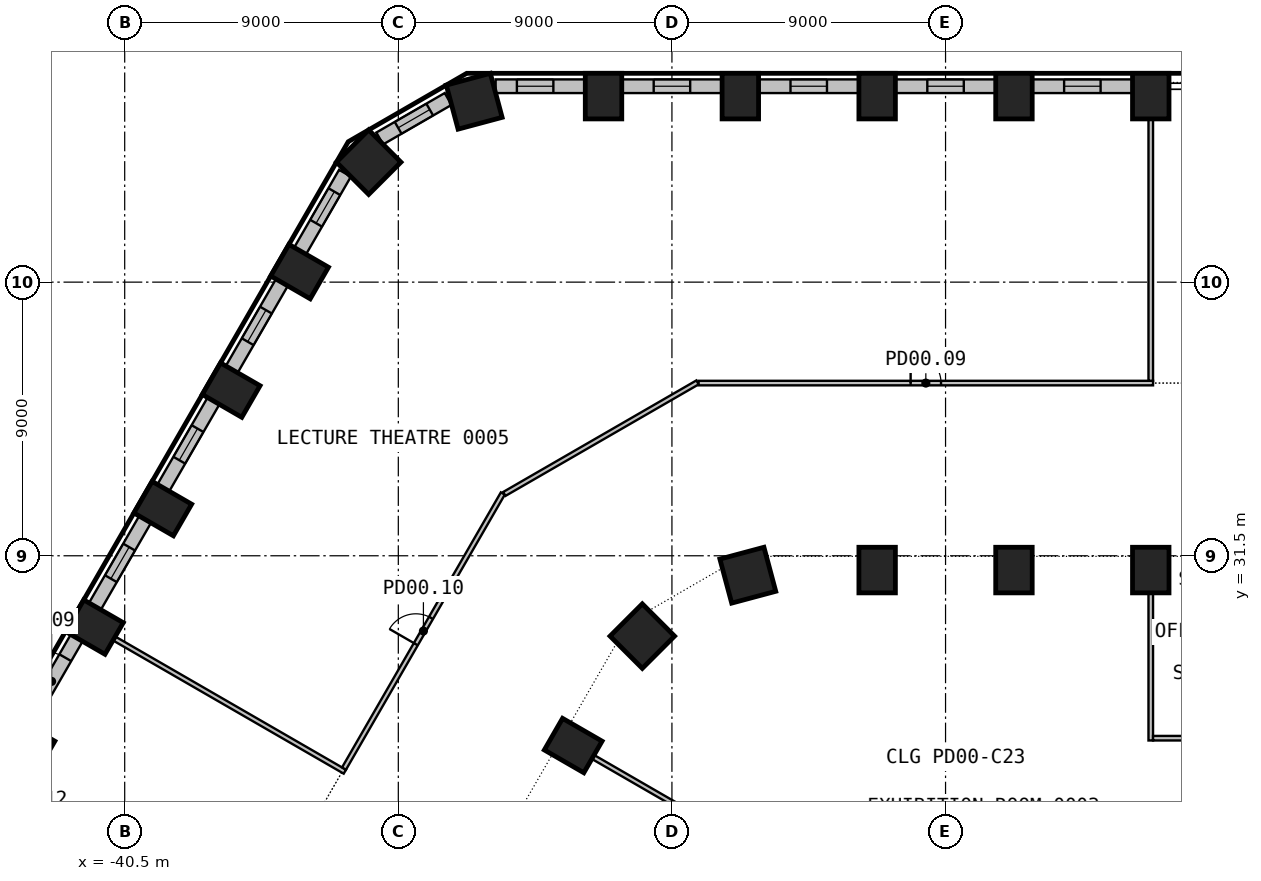
"""IFC4 building model, lengths in metres.
Left out: names, types, materials, properties, quantities, classifications, styles, units other than length and angle.
Written with IfcOpenShell. Run it as: python <this file> out.ifc"""

import sys

from ifc_helpers import new_model, si_unit, direction, frame, frame_2d, origin, origin_2d, place, context, subcontext, project, spatial, rectangle, extrude, element, fill, save


model = new_model("IFC4")
c1 = context("Model", 3, precision=1e-05, world=origin(), true_north=direction((0.0, 1.0)))
c2 = subcontext(c1, "Body", "Model", "MODEL_VIEW")
j1 = project(units=[si_unit("LENGTHUNIT", "METRE"), si_unit("PLANEANGLEUNIT", "RADIAN")], contexts=[c1])
p1 = place(None, origin())
s1 = spatial("IfcSite", under=j1, at=p1, CompositionType="ELEMENT")
p2 = place(p1, origin())
s2 = spatial("IfcBuilding", under=s1, at=p2, CompositionType="ELEMENT")
p3 = place(p2, origin())
s3 = spatial("IfcBuildingStorey", under=s2, at=p3, CompositionType="ELEMENT", Elevation=0.0)
for number, where, z_axis, x_axis in (
    (1, (-6.75, 46.618, 0.0), (0.0, 0.0, 1.0), (-1.0, 0.0, 0.0)),
    (2, (-11.25, 46.618, 0.0), (0.0, 0.0, 1.0), (-1.0, 0.0, 0.0)),
    (3, (-15.75, 46.618, 0.0), (0.0, 0.0, 1.0), (-1.0, 0.0, 0.0)),
    (4, (-20.25, 46.618, 0.0), (0.0, 0.0, 1.0), (-1.0, 0.0, 0.0)),
    (5, (-24.75, 46.618, 0.0), (0.0, 0.0, 1.0), (-1.0, 0.0, 0.0)),
):
    element("IfcColumn", number, at=place(p3, frame(where, z_axis=z_axis, x_axis=x_axis)), inside=s3, PredefinedType="COLUMN", context=c2, shape_type="SweptSolid", body=[
        extrude(rectangle(XDim=1.2, YDim=1.5, at=origin_2d()), origin(), (0.0, 0.0, 1.0), 6.0),
    ])
for number, where, z_axis, x_axis in (
    (6, (-29.004, 46.45, 0.0), (0.0, 0.0, 1.0), (-0.966, -0.259, 0.0)),
    (7, (-32.475, 44.446, 0.0), (0.0, 0.0, 1.0), (-0.707, -0.707, 0.0)),
):
    element("IfcColumn", number, at=place(p3, frame(where, z_axis=z_axis, x_axis=x_axis)), inside=s3, PredefinedType="COLUMN", context=c2, shape_type="SweptSolid", body=[
        extrude(rectangle(XDim=1.5, YDim=1.5, at=origin_2d()), origin(), (0.0, 0.0, 1.0), 6.0),
    ])
for number, where, z_axis, x_axis in (
    (8, (-34.748, 40.846, 0.0), (0.0, 0.0, 1.0), (-0.5, -0.866, 0.0)),
    (9, (-36.998, 36.949, 0.0), (0.0, 0.0, 1.0), (-0.5, -0.866, 0.0)),
    (10, (-39.248, 33.052, 0.0), (0.0, 0.0, 1.0), (-0.5, -0.866, 0.0)),
    (11, (-41.498, 29.155, 0.0), (0.0, 0.0, 1.0), (-0.5, -0.866, 0.0)),
    (12, (-43.748, 25.258, 0.0), (0.0, 0.0, 1.0), (-0.5, -0.866, 0.0)),
):
    element("IfcColumn", number, at=place(p3, frame(where, z_axis=z_axis, x_axis=x_axis)), inside=s3, PredefinedType="COLUMN", context=c2, shape_type="SweptSolid", body=[
        extrude(rectangle(XDim=1.2, YDim=1.5, at=origin_2d()), origin(), (0.0, 0.0, 1.0), 6.0),
    ])
for number, where, z_axis, x_axis in (
    (13, (-6.75, 31.03, 0.0), (0.0, 0.0, 1.0), (-1.0, 0.0, 0.0)),
    (14, (-11.25, 31.03, 0.0), (0.0, 0.0, 1.0), (-1.0, 0.0, 0.0)),
    (15, (-15.75, 31.03, 0.0), (0.0, 0.0, 1.0), (-1.0, 0.0, 0.0)),
):
    element("IfcColumn", number, at=place(p3, frame(where, z_axis=z_axis, x_axis=x_axis)), inside=s3, PredefinedType="COLUMN", context=c2, shape_type="SweptSolid", body=[
        extrude(rectangle(XDim=1.2, YDim=1.5, at=origin_2d()), origin(), (0.0, 0.0, 1.0), 5.6),
    ])
for number, where, z_axis, x_axis in (
    (16, (-20.004, 30.861, 0.0), (0.0, 0.0, 1.0), (-0.966, -0.259, 0.0)),
    (17, (-23.475, 28.857, 0.0), (0.0, 0.0, 1.0), (-0.707, -0.707, 0.0)),
):
    element("IfcColumn", number, at=place(p3, frame(where, z_axis=z_axis, x_axis=x_axis)), inside=s3, PredefinedType="COLUMN", context=c2, shape_type="SweptSolid", body=[
        extrude(rectangle(XDim=1.5, YDim=1.5, at=origin_2d()), origin(), (0.0, 0.0, 1.0), 5.6),
    ])
p4 = place(p3, frame((-25.748, 25.258, 0.0), z_axis=(0.0, 0.0, 1.0), x_axis=(-0.5, -0.866025403784, 0.0)))
e18 = element("IfcColumn", 18, at=p4, inside=s3, PredefinedType="COLUMN", context=c2, shape_type="SweptSolid", body=[
    extrude(rectangle(XDim=1.2, YDim=1.5, at=origin_2d()), origin(), (0.0, 0.0, 1.0), 5.6),
])
p5 = place(p3, frame((-7.351, 46.943, 0.0), z_axis=(0.0, 0.0, 1.0), x_axis=(-1.0, 0.0, 0.0)))
e19 = element("IfcWall", 19, at=p5, inside=s3, PredefinedType="SOLIDWALL", context=c2, shape_type="SweptSolid", body=[
    extrude(rectangle(XDim=3.299, YDim=0.45, at=frame_2d((1.649, 0.0))), origin(), (0.0, 0.0, 1.0), 6.0),
])
p6 = place(p5, frame((1.05, 0.0, 0.9)))
e20 = element("IfcOpeningElement", 20, at=p6, cuts=e19, PredefinedType="OPENING", context=c2, shape_type="SweptSolid", body=[
    extrude(rectangle(XDim=1.2, YDim=4.2, at=frame_2d((0.6, 2.1))), frame((0.0, 0.235, 0.0), z_axis=(0.0, -1.0, 0.0), x_axis=(1.0, 0.0, 0.0)), (0.0, 0.0, 1.0), 0.47),
])
p7 = place(p3, frame((-11.851, 46.943, 0.0), z_axis=(0.0, 0.0, 1.0), x_axis=(-1.0, 0.0, 0.0)))
e21 = element("IfcWall", 21, at=p7, inside=s3, PredefinedType="SOLIDWALL", context=c2, shape_type="SweptSolid", body=[
    extrude(rectangle(XDim=3.299, YDim=0.45, at=frame_2d((1.649, 0.0))), origin(), (0.0, 0.0, 1.0), 6.0),
])
p8 = place(p7, frame((1.05, 0.0, 0.9)))
e22 = element("IfcOpeningElement", 22, at=p8, cuts=e21, PredefinedType="OPENING", context=c2, shape_type="SweptSolid", body=[
    extrude(rectangle(XDim=1.2, YDim=4.2, at=frame_2d((0.6, 2.1))), frame((0.0, 0.235, 0.0), z_axis=(0.0, -1.0, 0.0), x_axis=(1.0, 0.0, 0.0)), (0.0, 0.0, 1.0), 0.47),
])
p9 = place(p3, frame((-16.351, 46.943, 0.0), z_axis=(0.0, 0.0, 1.0), x_axis=(-1.0, 0.0, 0.0)))
e23 = element("IfcWall", 23, at=p9, inside=s3, PredefinedType="SOLIDWALL", context=c2, shape_type="SweptSolid", body=[
    extrude(rectangle(XDim=3.299, YDim=0.45, at=frame_2d((1.649, 0.0))), origin(), (0.0, 0.0, 1.0), 6.0),
])
p10 = place(p9, frame((1.05, 0.0, 0.9)))
e24 = element("IfcOpeningElement", 24, at=p10, cuts=e23, PredefinedType="OPENING", context=c2, shape_type="SweptSolid", body=[
    extrude(rectangle(XDim=1.2, YDim=4.2, at=frame_2d((0.6, 2.1))), frame((0.0, 0.235, 0.0), z_axis=(0.0, -1.0, 0.0), x_axis=(1.0, 0.0, 0.0)), (0.0, 0.0, 1.0), 0.47),
])
p11 = place(p3, frame((-20.851, 46.943, 0.0), z_axis=(0.0, 0.0, 1.0), x_axis=(-1.0, 0.0, 0.0)))
e25 = element("IfcWall", 25, at=p11, inside=s3, PredefinedType="SOLIDWALL", context=c2, shape_type="SweptSolid", body=[
    extrude(rectangle(XDim=3.299, YDim=0.45, at=frame_2d((1.649, 0.0))), origin(), (0.0, 0.0, 1.0), 6.0),
])
p12 = place(p11, frame((1.05, 0.0, 0.9)))
e26 = element("IfcOpeningElement", 26, at=p12, cuts=e25, PredefinedType="OPENING", context=c2, shape_type="SweptSolid", body=[
    extrude(rectangle(XDim=1.2, YDim=4.2, at=frame_2d((0.6, 2.1))), frame((0.0, 0.235, 0.0), z_axis=(0.0, -1.0, 0.0), x_axis=(1.0, 0.0, 0.0)), (0.0, 0.0, 1.0), 0.47),
])
p13 = place(p3, frame((-25.351, 46.943, 0.0), z_axis=(0.0, 0.0, 1.0), x_axis=(-1.0, 0.0, 0.0)))
e27 = element("IfcWall", 27, at=p13, inside=s3, PredefinedType="SOLIDWALL", context=c2, shape_type="SweptSolid", body=[
    extrude(rectangle(XDim=2.948, YDim=0.45, at=frame_2d((1.474, 0.0))), origin(), (0.0, 0.0, 1.0), 6.0),
])
p14 = place(p13, frame((1.05, 0.0, 0.9)))
e28 = element("IfcOpeningElement", 28, at=p14, cuts=e27, PredefinedType="OPENING", context=c2, shape_type="SweptSolid", body=[
    extrude(rectangle(XDim=1.2, YDim=4.2, at=frame_2d((0.6, 2.1))), frame((0.0, 0.235, 0.0), z_axis=(0.0, -1.0, 0.0), x_axis=(1.0, 0.0, 0.0)), (0.0, 0.0, 1.0), 0.47),
])
p15 = place(p3, frame((-29.861, 46.525, 0.0), z_axis=(0.0, 0.0, 1.0), x_axis=(-0.866019710441, -0.50000986103, 0.0)))
e29 = element("IfcWall", 29, at=p15, inside=s3, PredefinedType="SOLIDWALL", context=c2, shape_type="SweptSolid", body=[
    extrude(rectangle(XDim=2.598, YDim=0.45, at=frame_2d((1.299, 0.0))), origin(), (0.0, 0.0, 1.0), 6.0),
])
p16 = place(p15, frame((0.699, 0.0, 0.9)))
e30 = element("IfcOpeningElement", 30, at=p16, cuts=e29, PredefinedType="OPENING", context=c2, shape_type="SweptSolid", body=[
    extrude(rectangle(XDim=1.2, YDim=4.2, at=frame_2d((0.6, 2.1))), frame((0.0, 0.235, 0.0), z_axis=(0.0, -1.0, 0.0), x_axis=(1.0, 0.0, 0.0)), (0.0, 0.0, 1.0), 0.47),
])
p17 = place(p3, frame((-33.254, 44.082, 0.0), z_axis=(0.0, 0.0, 1.0), x_axis=(-0.500030648271, -0.866007708274, 0.0)))
e31 = element("IfcWall", 31, at=p17, inside=s3, PredefinedType="SOLIDWALL", context=c2, shape_type="SweptSolid", body=[
    extrude(rectangle(XDim=2.948, YDim=0.45, at=frame_2d((1.474, 0.0))), origin(), (0.0, 0.0, 1.0), 6.0),
])
p18 = place(p17, frame((0.699, 0.0, 0.9)))
e32 = element("IfcOpeningElement", 32, at=p18, cuts=e31, PredefinedType="OPENING", context=c2, shape_type="SweptSolid", body=[
    extrude(rectangle(XDim=1.2, YDim=4.2, at=frame_2d((0.6, 2.1))), frame((0.0, 0.235, 0.0), z_axis=(0.0, -1.0, 0.0), x_axis=(1.0, 0.0, 0.0)), (0.0, 0.0, 1.0), 0.47),
])
p19 = place(p3, frame((-35.329, 40.489, 0.0), z_axis=(0.0, 0.0, 1.0), x_axis=(-0.499991515992, -0.866030301974, 0.0)))
e33 = element("IfcWall", 33, at=p19, inside=s3, PredefinedType="SOLIDWALL", context=c2, shape_type="SweptSolid", body=[
    extrude(rectangle(XDim=3.299, YDim=0.45, at=frame_2d((1.649, 0.0))), origin(), (0.0, 0.0, 1.0), 6.0),
])
p20 = place(p19, frame((1.05, 0.0, 0.9)))
e34 = element("IfcOpeningElement", 34, at=p20, cuts=e33, PredefinedType="OPENING", context=c2, shape_type="SweptSolid", body=[
    extrude(rectangle(XDim=1.2, YDim=4.2, at=frame_2d((0.6, 2.1))), frame((0.0, 0.235, 0.0), z_axis=(0.0, -1.0, 0.0), x_axis=(1.0, 0.0, 0.0)), (0.0, 0.0, 1.0), 0.47),
])
p21 = place(p3, frame((-37.579, 36.592, 0.0), z_axis=(0.0, 0.0, 1.0), x_axis=(-0.499991515992, -0.866030301974, 0.0)))
e35 = element("IfcWall", 35, at=p21, inside=s3, PredefinedType="SOLIDWALL", context=c2, shape_type="SweptSolid", body=[
    extrude(rectangle(XDim=3.299, YDim=0.45, at=frame_2d((1.649, 0.0))), origin(), (0.0, 0.0, 1.0), 6.0),
])
p22 = place(p21, frame((1.05, 0.0, 0.9)))
e36 = element("IfcOpeningElement", 36, at=p22, cuts=e35, PredefinedType="OPENING", context=c2, shape_type="SweptSolid", body=[
    extrude(rectangle(XDim=1.2, YDim=4.2, at=frame_2d((0.6, 2.1))), frame((0.0, 0.235, 0.0), z_axis=(0.0, -1.0, 0.0), x_axis=(1.0, 0.0, 0.0)), (0.0, 0.0, 1.0), 0.47),
])
p23 = place(p3, frame((-39.829, 32.694, 0.0), z_axis=(0.0, 0.0, 1.0), x_axis=(-0.499991515992, -0.866030301974, 0.0)))
e37 = element("IfcWall", 37, at=p23, inside=s3, PredefinedType="SOLIDWALL", context=c2, shape_type="SweptSolid", body=[
    extrude(rectangle(XDim=3.299, YDim=0.45, at=frame_2d((1.649, 0.0))), origin(), (0.0, 0.0, 1.0), 6.0),
])
p24 = place(p23, frame((1.05, 0.0, 0.9)))
e38 = element("IfcOpeningElement", 38, at=p24, cuts=e37, PredefinedType="OPENING", context=c2, shape_type="SweptSolid", body=[
    extrude(rectangle(XDim=1.2, YDim=4.2, at=frame_2d((0.6, 2.1))), frame((0.0, 0.235, 0.0), z_axis=(0.0, -1.0, 0.0), x_axis=(1.0, 0.0, 0.0)), (0.0, 0.0, 1.0), 0.47),
])
p25 = place(p3, frame((-43.729, 25.94, 0.0), z_axis=(0.0, 0.0, 1.0), x_axis=(0.49995947208, 0.866048801325, 0.0)))
e39 = element("IfcWall", 39, at=p25, inside=s3, PredefinedType="SOLIDWALL", context=c2, shape_type="SweptSolid", body=[
    extrude(rectangle(XDim=3.299, YDim=0.45, at=frame_2d((1.649, 0.0))), origin(), (0.0, 0.0, 1.0), 6.0),
])
p26 = place(p25, frame((0.75, 0.0, 0.0)))
e40 = element("IfcOpeningElement", 40, at=p26, cuts=e39, PredefinedType="OPENING", context=c2, shape_type="SweptSolid", body=[
    extrude(rectangle(XDim=1.8, YDim=2.4, at=frame_2d((0.9, 1.2))), frame((0.0, 0.235, 0.0), z_axis=(0.0, -1.0, 0.0), x_axis=(1.0, 0.0, 0.0)), (0.0, 0.0, 1.0), 0.47),
])
p27 = place(p3, frame((-40.831, 28.77, 0.0), z_axis=(0.0, 0.0, 1.0), x_axis=(0.866017712198, -0.500013321982, 0.0)))
e41 = element("IfcWall", 41, at=p27, inside=s3, PredefinedType="PARTITIONING", context=c2, shape_type="SweptSolid", body=[
    extrude(rectangle(XDim=8.743, YDim=0.15, at=frame_2d((4.372, 0.0))), origin(), (0.0, 0.0, 1.0), 6.0),
])
p28 = place(p3, frame((-33.287, 24.501, 0.0), z_axis=(0.0, 0.0, 1.0), x_axis=(0.500064997195, 0.865987874384, 0.0)))
e42 = element("IfcWall", 42, at=p28, inside=s3, PredefinedType="PARTITIONING", context=c2, shape_type="SweptSolid", body=[
    extrude(rectangle(XDim=10.447, YDim=0.15, at=frame_2d((5.223, 0.0))), origin(), (0.0, 0.0, 1.0), 6.0),
])
p29 = place(p28, frame((4.723, 0.0, 0.0)))
e43 = element("IfcOpeningElement", 43, at=p29, cuts=e42, PredefinedType="OPENING", context=c2, shape_type="SweptSolid", body=[
    extrude(rectangle(XDim=1.0, YDim=2.1, at=frame_2d((0.5, 1.05))), frame((0.0, 0.085, 0.0), z_axis=(0.0, -1.0, 0.0), x_axis=(1.0, 0.0, 0.0)), (0.0, 0.0, 1.0), 0.17),
])
p30 = place(p3, frame((-28.013, 33.533, 0.0), z_axis=(0.0, 0.0, 1.0), x_axis=(0.866011067739, 0.500024829938, 0.0)))
e44 = element("IfcWall", 44, at=p30, inside=s3, PredefinedType="PARTITIONING", context=c2, shape_type="SweptSolid", body=[
    extrude(rectangle(XDim=7.339, YDim=0.15, at=frame_2d((3.669, 0.0))), origin(), (0.0, 0.0, 1.0), 6.0),
])
p31 = place(p3, frame((-25.081, 24.873, 0.0), z_axis=(0.0, 0.0, 1.0), x_axis=(0.866011934562, -0.500023328652, 0.0)))
e45 = element("IfcWall", 45, at=p31, inside=s3, PredefinedType="PARTITIONING", context=c2, shape_type="SweptSolid", body=[
    extrude(rectangle(XDim=16.67, YDim=0.15, at=frame_2d((8.335, 0.0))), origin(), (0.0, 0.0, 1.0), 5.6),
])
p32 = place(p3, frame((-21.622, 37.18, 0.0), z_axis=(0.0, 0.0, 1.0), x_axis=(1.0, 0.0, 0.0)))
e46 = element("IfcWall", 46, at=p32, inside=s3, PredefinedType="PARTITIONING", context=c2, shape_type="SweptSolid", body=[
    extrude(rectangle(XDim=14.947, YDim=0.15, at=frame_2d((7.474, 0.0))), origin(), (0.0, 0.0, 1.0), 6.0),
])
p33 = place(p32, frame((6.973, 0.0, 0.0)))
e47 = element("IfcOpeningElement", 47, at=p33, cuts=e46, PredefinedType="OPENING", context=c2, shape_type="SweptSolid", body=[
    extrude(rectangle(XDim=1.0, YDim=2.1, at=frame_2d((0.5, 1.05))), frame((0.0, 0.085, 0.0), z_axis=(0.0, -1.0, 0.0), x_axis=(1.0, 0.0, 0.0)), (0.0, 0.0, 1.0), 0.17),
])
p34 = place(p3, frame((-6.75, 30.26, 0.0), z_axis=(0.0, 0.0, 1.0), x_axis=(0.0, -1.0, 0.0)))
e48 = element("IfcWall", 48, at=p34, inside=s3, PredefinedType="PARTITIONING", context=c2, shape_type="SweptSolid", body=[
    extrude(rectangle(XDim=4.835, YDim=0.15, at=frame_2d((2.417, 0.0))), origin(), (0.0, 0.0, 1.0), 5.6),
])
p35 = place(p3, frame((-6.675, 25.5, 0.0), z_axis=(0.0, 0.0, 1.0), x_axis=(1.0, 0.0, 0.0)))
e49 = element("IfcWall", 49, at=p35, inside=s3, PredefinedType="PARTITIONING", context=c2, shape_type="SweptSolid", body=[
    extrude(rectangle(XDim=4.35, YDim=0.15, at=frame_2d((2.175, 0.0))), origin(), (0.0, 0.0, 1.0), 5.6),
])
p36 = place(p3, frame((-6.75, 37.255, 0.0), z_axis=(0.0, 0.0, 1.0), x_axis=(0.0, 1.0, 0.0)))
e50 = element("IfcWall", 50, at=p36, inside=s3, PredefinedType="PARTITIONING", context=c2, shape_type="SweptSolid", body=[
    extrude(rectangle(XDim=8.594, YDim=0.15, at=frame_2d((4.297, 0.0))), origin(), (0.0, 0.0, 1.0), 6.0),
])
p37 = place(p6, origin())
e51 = element("IfcWindow", 51, at=p37, inside=s3, PartitioningType="SINGLE_PANEL", PredefinedType="WINDOW", context=c2, shape_type="SweptSolid", body=[
    extrude(rectangle(XDim=1.2, YDim=4.2, at=frame_2d((0.6, 2.1))), frame((0.0, 0.03, 0.0), z_axis=(0.0, -1.0, 0.0), x_axis=(1.0, 0.0, 0.0)), (0.0, 0.0, 1.0), 0.06),
])
fill(e20, e51)
p38 = place(p8, origin())
e52 = element("IfcWindow", 52, at=p38, inside=s3, PartitioningType="SINGLE_PANEL", PredefinedType="WINDOW", context=c2, shape_type="SweptSolid", body=[
    extrude(rectangle(XDim=1.2, YDim=4.2, at=frame_2d((0.6, 2.1))), frame((0.0, 0.03, 0.0), z_axis=(0.0, -1.0, 0.0), x_axis=(1.0, 0.0, 0.0)), (0.0, 0.0, 1.0), 0.06),
])
fill(e22, e52)
p39 = place(p10, origin())
e53 = element("IfcWindow", 53, at=p39, inside=s3, PartitioningType="SINGLE_PANEL", PredefinedType="WINDOW", context=c2, shape_type="SweptSolid", body=[
    extrude(rectangle(XDim=1.2, YDim=4.2, at=frame_2d((0.6, 2.1))), frame((0.0, 0.03, 0.0), z_axis=(0.0, -1.0, 0.0), x_axis=(1.0, 0.0, 0.0)), (0.0, 0.0, 1.0), 0.06),
])
fill(e24, e53)
p40 = place(p12, origin())
e54 = element("IfcWindow", 54, at=p40, inside=s3, PartitioningType="SINGLE_PANEL", PredefinedType="WINDOW", context=c2, shape_type="SweptSolid", body=[
    extrude(rectangle(XDim=1.2, YDim=4.2, at=frame_2d((0.6, 2.1))), frame((0.0, 0.03, 0.0), z_axis=(0.0, -1.0, 0.0), x_axis=(1.0, 0.0, 0.0)), (0.0, 0.0, 1.0), 0.06),
])
fill(e26, e54)
p41 = place(p14, origin())
e55 = element("IfcWindow", 55, at=p41, inside=s3, PartitioningType="SINGLE_PANEL", PredefinedType="WINDOW", context=c2, shape_type="SweptSolid", body=[
    extrude(rectangle(XDim=1.2, YDim=4.2, at=frame_2d((0.6, 2.1))), frame((0.0, 0.03, 0.0), z_axis=(0.0, -1.0, 0.0), x_axis=(1.0, 0.0, 0.0)), (0.0, 0.0, 1.0), 0.06),
])
fill(e28, e55)
p42 = place(p16, origin())
e56 = element("IfcWindow", 56, at=p42, inside=s3, PartitioningType="SINGLE_PANEL", PredefinedType="WINDOW", context=c2, shape_type="SweptSolid", body=[
    extrude(rectangle(XDim=1.2, YDim=4.2, at=frame_2d((0.6, 2.1))), frame((0.0, 0.03, 0.0), z_axis=(0.0, -1.0, 0.0), x_axis=(1.0, 0.0, 0.0)), (0.0, 0.0, 1.0), 0.06),
])
fill(e30, e56)
p43 = place(p18, origin())
e57 = element("IfcWindow", 57, at=p43, inside=s3, PartitioningType="SINGLE_PANEL", PredefinedType="WINDOW", context=c2, shape_type="SweptSolid", body=[
    extrude(rectangle(XDim=1.2, YDim=4.2, at=frame_2d((0.6, 2.1))), frame((0.0, 0.03, 0.0), z_axis=(0.0, -1.0, 0.0), x_axis=(1.0, 0.0, 0.0)), (0.0, 0.0, 1.0), 0.06),
])
fill(e32, e57)
p44 = place(p20, origin())
e58 = element("IfcWindow", 58, at=p44, inside=s3, PartitioningType="SINGLE_PANEL", PredefinedType="WINDOW", context=c2, shape_type="SweptSolid", body=[
    extrude(rectangle(XDim=1.2, YDim=4.2, at=frame_2d((0.6, 2.1))), frame((0.0, 0.03, 0.0), z_axis=(0.0, -1.0, 0.0), x_axis=(1.0, 0.0, 0.0)), (0.0, 0.0, 1.0), 0.06),
])
fill(e34, e58)
p45 = place(p22, origin())
e59 = element("IfcWindow", 59, at=p45, inside=s3, PartitioningType="SINGLE_PANEL", PredefinedType="WINDOW", context=c2, shape_type="SweptSolid", body=[
    extrude(rectangle(XDim=1.2, YDim=4.2, at=frame_2d((0.6, 2.1))), frame((0.0, 0.03, 0.0), z_axis=(0.0, -1.0, 0.0), x_axis=(1.0, 0.0, 0.0)), (0.0, 0.0, 1.0), 0.06),
])
fill(e36, e59)
p46 = place(p24, origin())
e60 = element("IfcWindow", 60, at=p46, inside=s3, PartitioningType="SINGLE_PANEL", PredefinedType="WINDOW", context=c2, shape_type="SweptSolid", body=[
    extrude(rectangle(XDim=1.2, YDim=4.2, at=frame_2d((0.6, 2.1))), frame((0.0, 0.03, 0.0), z_axis=(0.0, -1.0, 0.0), x_axis=(1.0, 0.0, 0.0)), (0.0, 0.0, 1.0), 0.06),
])
fill(e38, e60)
p47 = place(p26, origin())
e61 = element("IfcDoor", 61, at=p47, inside=s3, OperationType="DOUBLE_DOOR_SINGLE_SWING", PredefinedType="DOOR", context=c2, shape_type="SweptSolid", body=[
    extrude(rectangle(XDim=1.8, YDim=2.4, at=frame_2d((0.9, 1.2))), frame((0.0, 0.025, 0.0), z_axis=(0.0, -1.0, 0.0), x_axis=(1.0, 0.0, 0.0)), (0.0, 0.0, 1.0), 0.05),
])
fill(e40, e61)
p48 = place(p33, origin())
e62 = element("IfcDoor", 62, at=p48, inside=s3, OperationType="SINGLE_SWING_RIGHT", PredefinedType="DOOR", context=c2, shape_type="SweptSolid", body=[
    extrude(rectangle(XDim=1.0, YDim=2.1, at=frame_2d((0.5, 1.05))), frame((0.0, 0.025, 0.0), z_axis=(0.0, -1.0, 0.0), x_axis=(1.0, 0.0, 0.0)), (0.0, 0.0, 1.0), 0.05),
])
fill(e47, e62)
p49 = place(p29, origin())
e63 = element("IfcDoor", 63, at=p49, inside=s3, OperationType="SINGLE_SWING_RIGHT", PredefinedType="DOOR", context=c2, shape_type="SweptSolid", body=[
    extrude(rectangle(XDim=1.0, YDim=2.1, at=frame_2d((0.5, 1.05))), frame((0.0, 0.025, 0.0), z_axis=(0.0, -1.0, 0.0), x_axis=(1.0, 0.0, 0.0)), (0.0, 0.0, 1.0), 0.05),
])
fill(e43, e63)
save(model, sys.argv[1])
